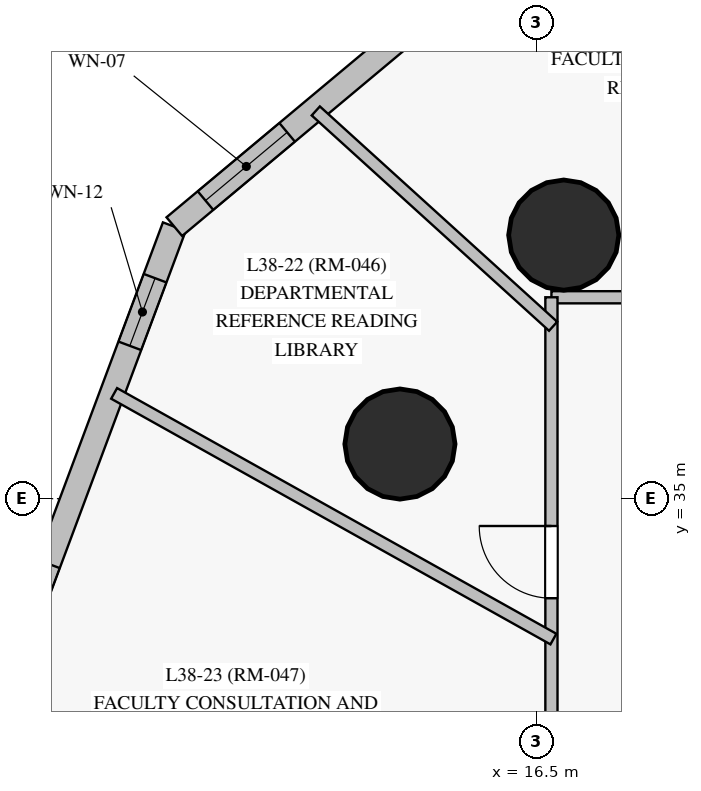
"""IFC4 building model, lengths in metres.
Left out: names, types, materials, properties, quantities, classifications, styles, units other than length and angle.
Written with IfcOpenShell. Run it as: python <this file> out.ifc"""

import sys

from ifc_helpers import new_model, si_unit, direction, frame, frame_2d, origin, origin_with_axes, origin_2d, place, context, subcontext, project, spatial, rectangle, circle, extrude, source, transform, mapped, element, fill, save


model = new_model("IFC4")
c1 = context("Model", 3, precision=1e-05, world=origin(), true_north=direction((0.0, 1.0)))
c2 = subcontext(c1, "Body", "Model", "MODEL_VIEW")
j1 = project(units=[si_unit("LENGTHUNIT", "METRE"), si_unit("PLANEANGLEUNIT", "RADIAN")], contexts=[c1])
p1 = place(None, origin())
s1 = spatial("IfcSite", under=j1, at=p1, CompositionType="ELEMENT")
p2 = place(p1, origin())
s2 = spatial("IfcBuilding", under=s1, at=p2, CompositionType="ELEMENT")
p3 = place(p2, frame((0.0, 0.0, 135.85)))
s3 = spatial("IfcBuildingStorey", under=s2, at=p3, CompositionType="ELEMENT", Elevation=135.85)
m1 = source(origin_with_axes(), c2, "Body", "SweptSolid", [
    extrude(circle(Radius=0.725, at=origin_2d()), origin(), (0.0, 0.0, 1.0), 3.05),
])
for number, where, z_axis, x_axis in (
    (1, (16.862, 38.468, 0.0), (0.0, 0.0, 1.0), (1.0, 0.0, 0.0)),
    (2, (14.707, 35.719, 0.0), (0.0, 0.0, 1.0), (1.0, 0.0, 0.0)),
):
    element("IfcColumn", number, at=place(p3, frame(where, z_axis=z_axis, x_axis=x_axis)), inside=s3, PredefinedType="COLUMN", context=c2, shape_type="MappedRepresentation", body=[
        mapped(m1, transform((0.0, 0.0, 0.0), scale=1.0)),
    ])
p4 = place(p3, frame((11.739, 38.579, 0.0), z_axis=(0.0, 0.0, 1.0), x_axis=(-0.349891213855, -0.936790338586, 0.0)))
e3 = element("IfcWall", 3, at=p4, inside=s3, PredefinedType="SOLIDWALL", context=c2, shape_type="SweptSolid", body=[
    extrude(rectangle(XDim=10.903, YDim=0.32, at=frame_2d((5.451, 0.0))), origin(), (0.0, 0.0, 1.0), 2.825),
])
p5 = place(p4, frame((0.724, 0.0, 0.85)))
e4 = element("IfcOpeningElement", 4, at=p5, cuts=e3, PredefinedType="OPENING", context=c2, shape_type="SweptSolid", body=[
    extrude(rectangle(XDim=0.95, YDim=1.5, at=frame_2d((0.475, 0.75))), frame((0.0, 0.17, 0.0), z_axis=(0.0, -1.0, 0.0), x_axis=(1.0, 0.0, 0.0)), (0.0, 0.0, 1.0), 0.34),
])
p6 = place(p4, frame((4.736, 0.0, 0.85)))
e5 = element("IfcOpeningElement", 5, at=p6, cuts=e3, PredefinedType="OPENING", context=c2, shape_type="SweptSolid", body=[
    extrude(rectangle(XDim=1.65, YDim=1.65, at=frame_2d((0.825, 0.825))), frame((0.0, 0.17, 0.0), z_axis=(0.0, -1.0, 0.0), x_axis=(1.0, 0.0, 0.0)), (0.0, 0.0, 1.0), 0.34),
])
p7 = place(p4, frame((9.338, 0.0, 0.85)))
e6 = element("IfcOpeningElement", 6, at=p7, cuts=e3, PredefinedType="OPENING", context=c2, shape_type="SweptSolid", body=[
    extrude(rectangle(XDim=0.95, YDim=1.5, at=frame_2d((0.475, 0.75))), frame((0.0, 0.17, 0.0), z_axis=(0.0, -1.0, 0.0), x_axis=(1.0, 0.0, 0.0)), (0.0, 0.0, 1.0), 0.34),
])
p8 = place(p3, frame((22.182, 47.308, 0.0), z_axis=(0.0, 0.0, 1.0), x_axis=(-0.767264774206, -0.641330465722, 0.0)))
e7 = element("IfcWall", 7, at=p8, inside=s3, PredefinedType="SOLIDWALL", context=c2, shape_type="SweptSolid", body=[
    extrude(rectangle(XDim=13.611, YDim=0.32, at=frame_2d((6.806, 0.0))), origin(), (0.0, 0.0, 1.0), 2.825),
])
p9 = place(p8, frame((1.139, 0.0, 0.85)))
e8 = element("IfcOpeningElement", 8, at=p9, cuts=e7, PredefinedType="OPENING", context=c2, shape_type="SweptSolid", body=[
    extrude(rectangle(XDim=1.65, YDim=1.65, at=frame_2d((0.825, 0.825))), frame((0.0, 0.17, 0.0), z_axis=(0.0, -1.0, 0.0), x_axis=(1.0, 0.0, 0.0)), (0.0, 0.0, 1.0), 0.34),
])
p10 = place(p8, frame((6.71, 0.0, 0.85)))
e9 = element("IfcOpeningElement", 9, at=p10, cuts=e7, PredefinedType="OPENING", context=c2, shape_type="SweptSolid", body=[
    extrude(rectangle(XDim=1.65, YDim=1.65, at=frame_2d((0.825, 0.825))), frame((0.0, 0.17, 0.0), z_axis=(0.0, -1.0, 0.0), x_axis=(1.0, 0.0, 0.0)), (0.0, 0.0, 1.0), 0.34),
])
p11 = place(p8, frame((11.677, 0.0, 0.85)))
e10 = element("IfcOpeningElement", 10, at=p11, cuts=e7, PredefinedType="OPENING", context=c2, shape_type="SweptSolid", body=[
    extrude(rectangle(XDim=1.4, YDim=1.65, at=frame_2d((0.7, 0.825))), frame((0.0, 0.17, 0.0), z_axis=(0.0, -1.0, 0.0), x_axis=(1.0, 0.0, 0.0)), (0.0, 0.0, 1.0), 0.34),
])
p12 = place(p3, frame((16.7, 37.65, 0.0), z_axis=(0.0, 0.0, 1.0), x_axis=(1.0, 0.0, 0.0)))
e11 = element("IfcWall", 11, at=p12, inside=s3, PredefinedType="PARTITIONING", context=c2, shape_type="SweptSolid", body=[
    extrude(rectangle(XDim=23.5, YDim=0.16, at=frame_2d((11.75, 0.0))), origin(), (0.0, 0.0, 1.0), 2.325),
])
p13 = place(p12, frame((22.193, 0.0, 0.0)))
e12 = element("IfcOpeningElement", 12, at=p13, cuts=e11, PredefinedType="OPENING", context=c2, shape_type="SweptSolid", body=[
    extrude(rectangle(XDim=0.95, YDim=2.15, at=frame_2d((0.475, 1.075))), frame((0.0, 0.09, 0.0), z_axis=(0.0, -1.0, 0.0), x_axis=(1.0, 0.0, 0.0)), (0.0, 0.0, 1.0), 0.18),
])
p14 = place(p12, frame((19.739, 0.0, 0.0)))
e13 = element("IfcOpeningElement", 13, at=p14, cuts=e11, PredefinedType="OPENING", context=c2, shape_type="SweptSolid", body=[
    extrude(rectangle(XDim=0.95, YDim=2.15, at=frame_2d((0.475, 1.075))), frame((0.0, 0.09, 0.0), z_axis=(0.0, -1.0, 0.0), x_axis=(1.0, 0.0, 0.0)), (0.0, 0.0, 1.0), 0.18),
])
p15 = place(p12, frame((17.15, 0.0, 0.0)))
e14 = element("IfcOpeningElement", 14, at=p15, cuts=e11, PredefinedType="OPENING", context=c2, shape_type="SweptSolid", body=[
    extrude(rectangle(XDim=0.95, YDim=2.15, at=frame_2d((0.475, 1.075))), frame((0.0, 0.09, 0.0), z_axis=(0.0, -1.0, 0.0), x_axis=(1.0, 0.0, 0.0)), (0.0, 0.0, 1.0), 0.18),
])
p16 = place(p12, frame((15.29, 0.0, 0.0)))
e15 = element("IfcOpeningElement", 15, at=p16, cuts=e11, PredefinedType="OPENING", context=c2, shape_type="SweptSolid", body=[
    extrude(rectangle(XDim=0.95, YDim=2.15, at=frame_2d((0.475, 1.075))), frame((0.0, 0.09, 0.0), z_axis=(0.0, -1.0, 0.0), x_axis=(1.0, 0.0, 0.0)), (0.0, 0.0, 1.0), 0.18),
])
p17 = place(p12, frame((13.507, 0.0, 0.0)))
e16 = element("IfcOpeningElement", 16, at=p17, cuts=e11, PredefinedType="OPENING", context=c2, shape_type="SweptSolid", body=[
    extrude(rectangle(XDim=0.95, YDim=2.15, at=frame_2d((0.475, 1.075))), frame((0.0, 0.09, 0.0), z_axis=(0.0, -1.0, 0.0), x_axis=(1.0, 0.0, 0.0)), (0.0, 0.0, 1.0), 0.18),
])
p18 = place(p12, frame((11.415, 0.0, 0.0)))
e17 = element("IfcOpeningElement", 17, at=p18, cuts=e11, PredefinedType="OPENING", context=c2, shape_type="SweptSolid", body=[
    extrude(rectangle(XDim=0.95, YDim=2.15, at=frame_2d((0.475, 1.075))), frame((0.0, 0.09, 0.0), z_axis=(0.0, -1.0, 0.0), x_axis=(1.0, 0.0, 0.0)), (0.0, 0.0, 1.0), 0.18),
])
p19 = place(p12, frame((9.772, 0.0, 0.0)))
e18 = element("IfcOpeningElement", 18, at=p19, cuts=e11, PredefinedType="OPENING", context=c2, shape_type="SweptSolid", body=[
    extrude(rectangle(XDim=0.95, YDim=2.15, at=frame_2d((0.475, 1.075))), frame((0.0, 0.09, 0.0), z_axis=(0.0, -1.0, 0.0), x_axis=(1.0, 0.0, 0.0)), (0.0, 0.0, 1.0), 0.18),
])
p20 = place(p12, frame((7.75, 0.0, 0.0)))
e19 = element("IfcOpeningElement", 19, at=p20, cuts=e11, PredefinedType="OPENING", context=c2, shape_type="SweptSolid", body=[
    extrude(rectangle(XDim=0.95, YDim=2.15, at=frame_2d((0.475, 1.075))), frame((0.0, 0.09, 0.0), z_axis=(0.0, -1.0, 0.0), x_axis=(1.0, 0.0, 0.0)), (0.0, 0.0, 1.0), 0.18),
])
p21 = place(p12, frame((3.021, 0.0, 0.0)))
e20 = element("IfcOpeningElement", 20, at=p21, cuts=e11, PredefinedType="OPENING", context=c2, shape_type="SweptSolid", body=[
    extrude(rectangle(XDim=0.95, YDim=2.15, at=frame_2d((0.475, 1.075))), frame((0.0, 0.09, 0.0), z_axis=(0.0, -1.0, 0.0), x_axis=(1.0, 0.0, 0.0)), (0.0, 0.0, 1.0), 0.18),
])
p22 = place(p3, frame((16.7, 15.35, 0.0), z_axis=(0.0, 0.0, 1.0), x_axis=(0.0, 1.0, 0.0)))
e21 = element("IfcWall", 21, at=p22, inside=s3, PredefinedType="PARTITIONING", context=c2, shape_type="SweptSolid", body=[
    extrude(rectangle(XDim=22.3, YDim=0.16, at=frame_2d((11.15, 0.0))), origin(), (0.0, 0.0, 1.0), 2.225),
])
p23 = place(p22, frame((7.33, 0.0, 0.0)))
e22 = element("IfcOpeningElement", 22, at=p23, cuts=e21, PredefinedType="OPENING", context=c2, shape_type="SweptSolid", body=[
    extrude(rectangle(XDim=0.95, YDim=2.15, at=frame_2d((0.475, 1.075))), frame((0.0, 0.09, 0.0), z_axis=(0.0, -1.0, 0.0), x_axis=(1.0, 0.0, 0.0)), (0.0, 0.0, 1.0), 0.18),
])
p24 = place(p22, frame((3.903, 0.0, 0.0)))
e23 = element("IfcOpeningElement", 23, at=p24, cuts=e21, PredefinedType="OPENING", context=c2, shape_type="SweptSolid", body=[
    extrude(rectangle(XDim=0.96, YDim=2.15, at=frame_2d((0.48, 1.075))), frame((0.0, 0.09, 0.0), z_axis=(0.0, -1.0, 0.0), x_axis=(1.0, 0.0, 0.0)), (0.0, 0.0, 1.0), 0.18),
])
p25 = place(p22, frame((18.341, 0.0, 0.0)))
e24 = element("IfcOpeningElement", 24, at=p25, cuts=e21, PredefinedType="OPENING", context=c2, shape_type="SweptSolid", body=[
    extrude(rectangle(XDim=0.95, YDim=2.15, at=frame_2d((0.475, 1.075))), frame((0.0, 0.09, 0.0), z_axis=(0.0, -1.0, 0.0), x_axis=(1.0, 0.0, 0.0)), (0.0, 0.0, 1.0), 0.18),
])
p26 = place(p22, frame((14.02, 0.0, 0.0)))
e25 = element("IfcOpeningElement", 25, at=p26, cuts=e21, PredefinedType="OPENING", context=c2, shape_type="SweptSolid", body=[
    extrude(rectangle(XDim=0.95, YDim=2.15, at=frame_2d((0.475, 1.075))), frame((0.0, 0.09, 0.0), z_axis=(0.0, -1.0, 0.0), x_axis=(1.0, 0.0, 0.0)), (0.0, 0.0, 1.0), 0.18),
])
p27 = place(p22, frame((10.675, 0.0, 0.0)))
e26 = element("IfcOpeningElement", 26, at=p27, cuts=e21, PredefinedType="OPENING", context=c2, shape_type="SweptSolid", body=[
    extrude(rectangle(XDim=0.95, YDim=2.15, at=frame_2d((0.475, 1.075))), frame((0.0, 0.09, 0.0), z_axis=(0.0, -1.0, 0.0), x_axis=(1.0, 0.0, 0.0)), (0.0, 0.0, 1.0), 0.18),
])
p28 = place(p3, frame((16.726, 33.153, 0.0), z_axis=(0.0, 0.0, 1.0), x_axis=(-0.87280260427, 0.488073369464, 0.0)))
e27 = element("IfcWall", 27, at=p28, inside=s3, PredefinedType="PARTITIONING", context=c2, shape_type="SweptSolid", body=[
    extrude(rectangle(XDim=6.622, YDim=0.16, at=frame_2d((3.311, 0.0))), origin(), (0.0, 0.0, 1.0), 2.825),
])
p29 = place(p3, frame((16.722, 37.268, 0.0), z_axis=(0.0, 0.0, 1.0), x_axis=(-0.740555502335, 0.671995199359, 0.0)))
e28 = element("IfcWall", 28, at=p29, inside=s3, PredefinedType="PARTITIONING", context=c2, shape_type="SweptSolid", body=[
    extrude(rectangle(XDim=4.216, YDim=0.16, at=frame_2d((2.108, 0.0))), origin(), (0.0, 0.0, 1.0), 2.825),
])
m2 = source(origin_with_axes(), c2, "Body", "SweptSolid", [
    extrude(rectangle(XDim=0.95, YDim=1.5, at=frame_2d((0.475, 0.75))), frame((0.0, 0.03, 0.0), z_axis=(0.0, -1.0, 0.0), x_axis=(1.0, 0.0, 0.0)), (0.0, 0.0, 1.0), 0.06),
])
p30 = place(p5, origin())
e29 = element("IfcWindow", 29, at=p30, inside=s3, PartitioningType="SINGLE_PANEL", PredefinedType="WINDOW", context=c2, shape_type="MappedRepresentation", body=[
    mapped(m2, transform((0.0, 0.0, 0.0), scale=1.0)),
])
fill(e4, e29)
m3 = source(origin_with_axes(), c2, "Body", "SweptSolid", [
    extrude(rectangle(XDim=1.4, YDim=1.65, at=frame_2d((0.7, 0.825))), frame((0.0, 0.03, 0.0), z_axis=(0.0, -1.0, 0.0), x_axis=(1.0, 0.0, 0.0)), (0.0, 0.0, 1.0), 0.06),
])
p31 = place(p11, origin())
e30 = element("IfcWindow", 30, at=p31, inside=s3, PartitioningType="SINGLE_PANEL", PredefinedType="WINDOW", context=c2, shape_type="MappedRepresentation", body=[
    mapped(m3, transform((0.0, 0.0, 0.0), scale=1.0)),
])
fill(e10, e30)
m4 = source(origin_with_axes(), c2, "Body", "SweptSolid", [
    extrude(rectangle(XDim=0.95, YDim=2.15, at=frame_2d((0.475, 1.075))), frame((0.0, 0.025, 0.0), z_axis=(0.0, -1.0, 0.0), x_axis=(1.0, 0.0, 0.0)), (0.0, 0.0, 1.0), 0.05),
])
p32 = place(p25, origin())
e31 = element("IfcDoor", 31, at=p32, inside=s3, OperationType="SINGLE_SWING_RIGHT", PredefinedType="DOOR", context=c2, shape_type="MappedRepresentation", body=[
    mapped(m4, transform((0.0, 0.0, 0.0), scale=1.0)),
])
fill(e24, e31)
save(model, sys.argv[1])
